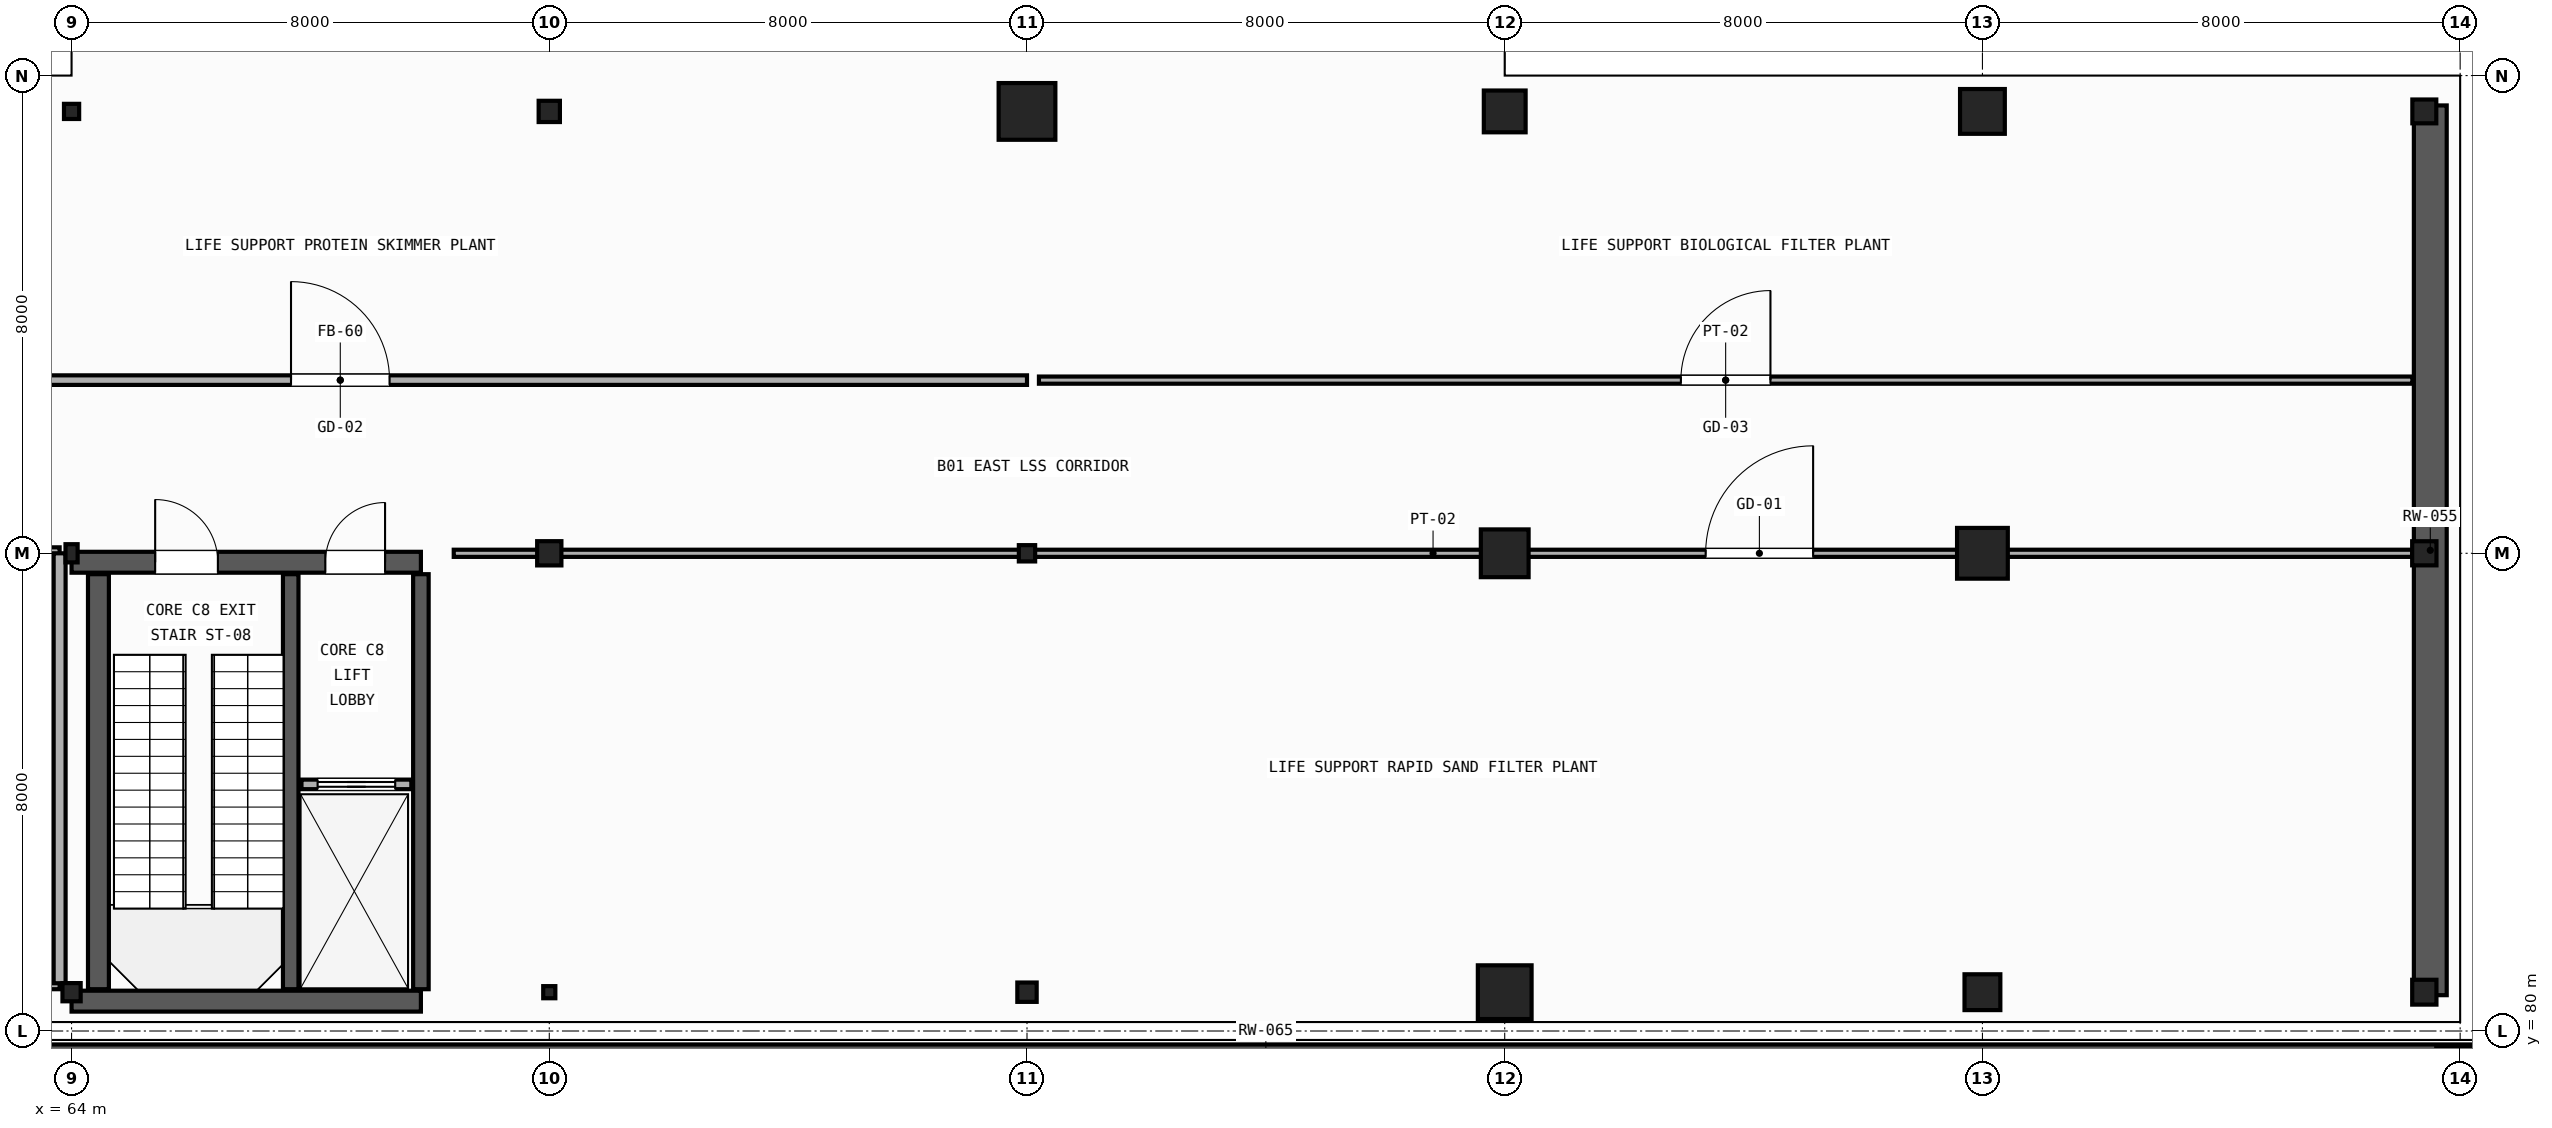
"""IFC4 building model, lengths in metres.
Left out: names, types, materials, properties, quantities, classifications, styles, units other than length and angle.
Written with IfcOpenShell. Run it as: python <this file> out.ifc"""

import sys

from ifc_helpers import new_model, si_unit, direction, frame, frame_2d, origin, origin_2d, place, context, subcontext, project, spatial, rectangle, hollow_rectangle, circle, hollow_circle, i_section, extrude, element, fill, save


model = new_model("IFC4")
c1 = context("Model", 3, precision=1e-05, world=origin(), true_north=direction((0.0, 1.0)))
c2 = subcontext(c1, "Body", "Model", "MODEL_VIEW")
j1 = project(units=[si_unit("LENGTHUNIT", "METRE"), si_unit("PLANEANGLEUNIT", "RADIAN")], contexts=[c1])
p1 = place(None, origin())
s1 = spatial("IfcSite", under=j1, at=p1, CompositionType="ELEMENT")
p2 = place(p1, origin())
s2 = spatial("IfcBuilding", under=s1, at=p2, CompositionType="ELEMENT")
p3 = place(p2, frame((0.0, 0.0, -5.4)))
s3 = spatial("IfcBuildingStorey", under=s2, at=p3, CompositionType="ELEMENT", Elevation=-5.4)
p4 = place(p3, frame((104.0, 79.35, 0.0), z_axis=(0.0, 0.0, 1.0), x_axis=(1.0, 0.0, 0.0)))
e1 = element("IfcColumn", 1, at=p4, inside=s3, PredefinedType="COLUMN", context=c2, shape_type="SweptSolid", body=[
    extrude(rectangle(XDim=0.8, YDim=0.8, at=origin_2d()), origin(), (0.0, 0.0, 1.0), 5.04),
])
p5 = place(p3, frame((64.0, 80.65, 0.0), z_axis=(0.0, 0.0, 1.0), x_axis=(0.0, 1.0, 0.0)))
e2 = element("IfcColumn", 2, at=p5, inside=s3, PredefinedType="COLUMN", context=c2, shape_type="SweptSolid", body=[
    extrude(hollow_rectangle(XDim=0.305, YDim=0.305, WallThickness=0.012, InnerFilletRadius=0.012, OuterFilletRadius=0.024, at=origin_2d()), origin(), (0.0, 0.0, 1.0), 5.04),
])
p6 = place(p3, frame((64.0, 88.0, 0.0), z_axis=(0.0, 0.0, 1.0), x_axis=(1.0, 0.0, 0.0)))
e3 = element("IfcColumn", 3, at=p6, inside=s3, PredefinedType="COLUMN", context=c2, shape_type="SweptSolid", body=[
    extrude(hollow_rectangle(XDim=0.203, YDim=0.305, WallThickness=0.009, InnerFilletRadius=0.009, OuterFilletRadius=0.018, at=origin_2d()), origin(), (0.0, 0.0, 1.0), 5.04),
])
p7 = place(p3, frame((64.0, 95.4, 0.0), z_axis=(0.0, 0.0, 1.0), x_axis=(0.0, 1.0, 0.0)))
e4 = element("IfcColumn", 4, at=p7, inside=s3, PredefinedType="COLUMN", context=c2, shape_type="SweptSolid", body=[
    extrude(hollow_rectangle(XDim=0.254, YDim=0.254, WallThickness=0.012, InnerFilletRadius=0.012, OuterFilletRadius=0.024, at=origin_2d()), origin(), (0.0, 0.0, 1.0), 5.04),
])
p8 = place(p3, frame((72.0, 80.65, 0.0), z_axis=(0.0, 0.0, 1.0), x_axis=(1.0, 0.0, 0.0)))
e5 = element("IfcColumn", 5, at=p8, inside=s3, PredefinedType="COLUMN", context=c2, shape_type="SweptSolid", body=[
    extrude(hollow_rectangle(XDim=0.203, YDim=0.203, WallThickness=0.009, InnerFilletRadius=0.009, OuterFilletRadius=0.018, at=origin_2d()), origin(), (0.0, 0.0, 1.0), 5.04),
])
p9 = place(p3, frame((72.0, 88.0, 0.0), z_axis=(0.0, 0.0, 1.0), x_axis=(0.0, 1.0, 0.0)))
e6 = element("IfcColumn", 6, at=p9, inside=s3, PredefinedType="COLUMN", context=c2, shape_type="SweptSolid", body=[
    extrude(hollow_circle(Radius=0.203, WallThickness=0.012, at=origin_2d()), origin(), (0.0, 0.0, 1.0), 5.04),
])
p10 = place(p3, frame((72.0, 95.4, 0.0), z_axis=(0.0, 0.0, 1.0), x_axis=(1.0, 0.0, 0.0)))
e7 = element("IfcColumn", 7, at=p10, inside=s3, PredefinedType="COLUMN", context=c2, shape_type="SweptSolid", body=[
    extrude(hollow_circle(Radius=0.178, WallThickness=0.012, at=origin_2d()), origin(), (0.0, 0.0, 1.0), 5.04),
])
p11 = place(p3, frame((80.0, 80.65, 0.0), z_axis=(0.0, 0.0, 1.0), x_axis=(0.0, 1.0, 0.0)))
e8 = element("IfcColumn", 8, at=p11, inside=s3, PredefinedType="COLUMN", context=c2, shape_type="SweptSolid", body=[
    extrude(hollow_circle(Radius=0.162, WallThickness=0.012, at=origin_2d()), origin(), (0.0, 0.0, 1.0), 5.04),
])
p12 = place(p3, frame((80.0, 88.0, 0.0), z_axis=(0.0, 0.0, 1.0), x_axis=(1.0, 0.0, 0.0)))
e9 = element("IfcColumn", 9, at=p12, inside=s3, PredefinedType="COLUMN", context=c2, shape_type="SweptSolid", body=[
    extrude(hollow_circle(Radius=0.136, WallThickness=0.012, at=origin_2d()), origin(), (0.0, 0.0, 1.0), 5.04),
])
p13 = place(p3, frame((80.0, 95.4, 0.0), z_axis=(0.0, 0.0, 1.0), x_axis=(0.0, 1.0, 0.0)))
e10 = element("IfcColumn", 10, at=p13, inside=s3, PredefinedType="COLUMN", context=c2, shape_type="SweptSolid", body=[
    extrude(rectangle(XDim=0.95, YDim=0.95, at=origin_2d()), origin(), (0.0, 0.0, 1.0), 5.04),
])
p14 = place(p3, frame((88.0, 80.65, 0.0), z_axis=(0.0, 0.0, 1.0), x_axis=(1.0, 0.0, 0.0)))
e11 = element("IfcColumn", 11, at=p14, inside=s3, PredefinedType="COLUMN", context=c2, shape_type="SweptSolid", body=[
    extrude(rectangle(XDim=0.9, YDim=0.9, at=origin_2d()), origin(), (0.0, 0.0, 1.0), 5.04),
])
p15 = place(p3, frame((88.0, 88.0, 0.0), z_axis=(0.0, 0.0, 1.0), x_axis=(0.0, 1.0, 0.0)))
e12 = element("IfcColumn", 12, at=p15, inside=s3, PredefinedType="COLUMN", context=c2, shape_type="SweptSolid", body=[
    extrude(rectangle(XDim=0.8, YDim=0.8, at=origin_2d()), origin(), (0.0, 0.0, 1.0), 5.04),
])
p16 = place(p3, frame((88.0, 95.4, 0.0), z_axis=(0.0, 0.0, 1.0), x_axis=(1.0, 0.0, 0.0)))
e13 = element("IfcColumn", 13, at=p16, inside=s3, PredefinedType="COLUMN", context=c2, shape_type="SweptSolid", body=[
    extrude(rectangle(XDim=0.7, YDim=0.7, at=origin_2d()), origin(), (0.0, 0.0, 1.0), 5.04),
])
p17 = place(p3, frame((96.0, 80.65, 0.0), z_axis=(0.0, 0.0, 1.0), x_axis=(0.0, 1.0, 0.0)))
e14 = element("IfcColumn", 14, at=p17, inside=s3, PredefinedType="COLUMN", context=c2, shape_type="SweptSolid", body=[
    extrude(rectangle(XDim=0.6, YDim=0.6, at=origin_2d()), origin(), (0.0, 0.0, 1.0), 5.04),
])
p18 = place(p3, frame((96.0, 88.0, 0.0), z_axis=(0.0, 0.0, 1.0), x_axis=(1.0, 0.0, 0.0)))
e15 = element("IfcColumn", 15, at=p18, inside=s3, PredefinedType="COLUMN", context=c2, shape_type="SweptSolid", body=[
    extrude(circle(Radius=0.425, at=origin_2d()), origin(), (0.0, 0.0, 1.0), 5.04),
])
p19 = place(p3, frame((96.0, 95.4, 0.0), z_axis=(0.0, 0.0, 1.0), x_axis=(0.0, 1.0, 0.0)))
e16 = element("IfcColumn", 16, at=p19, inside=s3, PredefinedType="COLUMN", context=c2, shape_type="SweptSolid", body=[
    extrude(circle(Radius=0.375, at=origin_2d()), origin(), (0.0, 0.0, 1.0), 5.04),
])
p20 = place(p3, frame((103.4, 80.65, 0.0), z_axis=(0.0, 0.0, 1.0), x_axis=(1.0, 0.0, 0.0)))
e17 = element("IfcColumn", 17, at=p20, inside=s3, PredefinedType="COLUMN", context=c2, shape_type="SweptSolid", body=[
    extrude(i_section(OverallWidth=0.406, OverallDepth=0.416, WebThickness=0.03, FlangeThickness=0.048, FilletRadius=0.015, at=origin_2d()), origin(), (0.0, 0.0, 1.0), 5.04),
])
p21 = place(p3, frame((103.4, 88.0, 0.0), z_axis=(0.0, 0.0, 1.0), x_axis=(0.0, 1.0, 0.0)))
e18 = element("IfcColumn", 18, at=p21, inside=s3, PredefinedType="COLUMN", context=c2, shape_type="SweptSolid", body=[
    extrude(i_section(OverallWidth=0.404, OverallDepth=0.407, WebThickness=0.027, FlangeThickness=0.044, FilletRadius=0.015, at=origin_2d()), origin(), (0.0, 0.0, 1.0), 5.04),
])
p22 = place(p3, frame((103.4, 95.4, 0.0), z_axis=(0.0, 0.0, 1.0), x_axis=(1.0, 0.0, 0.0)))
e19 = element("IfcColumn", 19, at=p22, inside=s3, PredefinedType="COLUMN", context=c2, shape_type="SweptSolid", body=[
    extrude(i_section(OverallWidth=0.401, OverallDepth=0.399, WebThickness=0.025, FlangeThickness=0.04, FilletRadius=0.015, at=origin_2d()), origin(), (0.0, 0.0, 1.0), 5.04),
])
p23 = place(p3, frame((60.0, 79.45, 0.0), z_axis=(0.0, 0.0, 1.0), x_axis=(1.0, 0.0, 0.0)))
e20 = element("IfcWall", 20, at=p23, inside=s3, PredefinedType="USERDEFINED", context=c2, shape_type="SweptSolid", body=[
    extrude(rectangle(XDim=48.0, YDim=0.65, at=frame_2d((24.0, 0.0))), origin(), (0.0, 0.0, 1.0), 5.02),
])
p24 = place(p3, frame((103.5, 80.6, 0.0), z_axis=(0.0, 0.0, 1.0), x_axis=(0.0, 1.0, 0.0)))
e21 = element("IfcWall", 21, at=p24, inside=s3, PredefinedType="USERDEFINED", context=c2, shape_type="SweptSolid", body=[
    extrude(rectangle(XDim=14.9, YDim=0.55, at=frame_2d((7.45, 0.0))), origin(), (0.0, 0.0, 1.0), 5.02),
])
p25 = place(p3, frame((64.0, 87.85, 0.0), z_axis=(0.0, 0.0, 1.0), x_axis=(1.0, 0.0, 0.0)))
e22 = element("IfcWall", 22, at=p25, inside=s3, PredefinedType="SHEAR", context=c2, shape_type="SweptSolid", body=[
    extrude(rectangle(XDim=5.85, YDim=0.35, at=frame_2d((2.925, 0.0))), origin(), (0.0, 0.0, 1.0), 5.03),
])
p26 = place(p25, frame((1.4, 0.0, 0.0)))
e23 = element("IfcOpeningElement", 23, at=p26, cuts=e22, PredefinedType="OPENING", context=c2, shape_type="SweptSolid", body=[
    extrude(rectangle(XDim=1.05, YDim=2.1, at=frame_2d((0.525, 1.05))), frame((0.0, 0.185, 0.0), z_axis=(0.0, -1.0, 0.0), x_axis=(1.0, 0.0, 0.0)), (0.0, 0.0, 1.0), 0.37),
])
p27 = place(p25, frame((4.25, 0.0, 0.0)))
e24 = element("IfcOpeningElement", 24, at=p27, cuts=e22, PredefinedType="OPENING", context=c2, shape_type="SweptSolid", body=[
    extrude(rectangle(XDim=1.0, YDim=2.15, at=frame_2d((0.5, 1.075))), frame((0.0, 0.185, 0.0), z_axis=(0.0, -1.0, 0.0), x_axis=(1.0, 0.0, 0.0)), (0.0, 0.0, 1.0), 0.37),
])
p28 = place(p3, frame((64.0, 80.5, 0.0), z_axis=(0.0, 0.0, 1.0), x_axis=(1.0, 0.0, 0.0)))
e25 = element("IfcWall", 25, at=p28, inside=s3, PredefinedType="SHEAR", context=c2, shape_type="SweptSolid", body=[
    extrude(rectangle(XDim=5.85, YDim=0.35, at=frame_2d((2.925, 0.0))), origin(), (0.0, 0.0, 1.0), 5.03),
])
p29 = place(p3, frame((64.45, 80.7, 0.0), z_axis=(0.0, 0.0, 1.0), x_axis=(0.0, 1.0, 0.0)))
e26 = element("IfcWall", 26, at=p29, inside=s3, PredefinedType="SHEAR", context=c2, shape_type="SweptSolid", body=[
    extrude(rectangle(XDim=6.95, YDim=0.35, at=frame_2d((3.475, 0.0))), origin(), (0.0, 0.0, 1.0), 5.03),
])
for number, where, z_axis, x_axis in (
    (27, (69.85, 80.7, 0.0), (0.0, 0.0, 1.0), (0.0, 1.0, 0.0)),
    (28, (67.67, 80.7, 0.0), (0.0, 0.0, 1.0), (0.0, 1.0, 0.0)),
):
    element("IfcWall", number, at=place(p3, frame(where, z_axis=z_axis, x_axis=x_axis)), inside=s3, PredefinedType="SHEAR", context=c2, shape_type="SweptSolid", body=[
        extrude(rectangle(XDim=6.95, YDim=0.26, at=frame_2d((3.475, 0.0))), origin(), (0.0, 0.0, 1.0), 5.03),
    ])
p30 = place(p3, frame((67.85, 84.13, 0.0), z_axis=(0.0, 0.0, 1.0), x_axis=(1.0, 0.0, 0.0)))
e29 = element("IfcWall", 29, at=p30, inside=s3, PredefinedType="PARTITIONING", context=c2, shape_type="SweptSolid", body=[
    extrude(rectangle(XDim=1.84, YDim=0.16, at=frame_2d((0.92, 0.0))), origin(), (0.0, 0.0, 1.0), 3.6),
])
p31 = place(p30, frame((0.27, 0.0, 0.0)))
e30 = element("IfcOpeningElement", 30, at=p31, cuts=e29, PredefinedType="OPENING", context=c2, shape_type="SweptSolid", body=[
    extrude(rectangle(XDim=1.3, YDim=2.2, at=frame_2d((0.65, 1.1))), frame((0.0, 0.09, 0.0), z_axis=(0.0, -1.0, 0.0), x_axis=(1.0, 0.0, 0.0)), (0.0, 0.0, 1.0), 0.18),
])
p32 = place(p3, frame((57.0, 88.0, 0.0), z_axis=(0.0, 0.0, 1.0), x_axis=(1.0, 0.0, 0.0)))
e31 = element("IfcWall", 31, at=p32, inside=s3, PredefinedType="PLUMBINGWALL", context=c2, shape_type="SweptSolid", body=[
    extrude(rectangle(XDim=6.8, YDim=0.2, at=frame_2d((3.4, 0.0))), origin(), (0.0, 0.0, 1.0), 4.29),
])
p33 = place(p32, frame((2.945, 0.0, 0.0)))
e32 = element("IfcOpeningElement", 32, at=p33, cuts=e31, PredefinedType="OPENING", context=c2, shape_type="SweptSolid", body=[
    extrude(rectangle(XDim=0.91, YDim=2.1, at=frame_2d((0.455, 1.05))), frame((0.0, 0.11, 0.0), z_axis=(0.0, -1.0, 0.0), x_axis=(1.0, 0.0, 0.0)), (0.0, 0.0, 1.0), 0.22),
])
p34 = place(p3, frame((57.0, 80.8, 0.0), z_axis=(0.0, 0.0, 1.0), x_axis=(1.0, 0.0, 0.0)))
e33 = element("IfcWall", 33, at=p34, inside=s3, PredefinedType="PLUMBINGWALL", context=c2, shape_type="SweptSolid", body=[
    extrude(rectangle(XDim=6.8, YDim=0.2, at=frame_2d((3.4, 0.0))), origin(), (0.0, 0.0, 1.0), 4.29),
])
p35 = place(p3, frame((63.8, 80.8, 0.0), z_axis=(0.0, 0.0, 1.0), x_axis=(0.0, 1.0, 0.0)))
e34 = element("IfcWall", 34, at=p35, inside=s3, PredefinedType="PLUMBINGWALL", context=c2, shape_type="SweptSolid", body=[
    extrude(rectangle(XDim=7.2, YDim=0.2, at=frame_2d((3.6, 0.0))), origin(), (0.0, 0.0, 1.0), 4.29),
])
p36 = place(p3, frame((70.4, 88.0, 0.0), z_axis=(0.0, 0.0, 1.0), x_axis=(1.0, 0.0, 0.0)))
e35 = element("IfcWall", 35, at=p36, inside=s3, PredefinedType="PARTITIONING", context=c2, shape_type="SweptSolid", body=[
    extrude(rectangle(XDim=32.8, YDim=0.12, at=frame_2d((16.4, 0.0))), origin(), (0.0, 0.0, 1.0), 4.238),
])
p37 = place(p36, frame((20.965, 0.0, 0.0)))
e36 = element("IfcOpeningElement", 36, at=p37, cuts=e35, PredefinedType="OPENING", context=c2, shape_type="SweptSolid", body=[
    extrude(rectangle(XDim=1.8, YDim=2.4, at=frame_2d((0.9, 1.2))), frame((0.0, 0.07, 0.0), z_axis=(0.0, -1.0, 0.0), x_axis=(1.0, 0.0, 0.0)), (0.0, 0.0, 1.0), 0.14),
])
p38 = place(p3, frame((57.0, 90.9, 0.0), z_axis=(0.0, 0.0, 1.0), x_axis=(1.0, 0.0, 0.0)))
e37 = element("IfcWall", 37, at=p38, inside=s3, PredefinedType="PARTITIONING", context=c2, shape_type="SweptSolid", body=[
    extrude(rectangle(XDim=23.0, YDim=0.16, at=frame_2d((11.5, 0.0))), origin(), (0.0, 0.0, 1.0), 4.29),
])
p39 = place(p38, frame((10.675, 0.0, 0.0)))
e38 = element("IfcOpeningElement", 38, at=p39, cuts=e37, PredefinedType="OPENING", context=c2, shape_type="SweptSolid", body=[
    extrude(rectangle(XDim=1.65, YDim=2.35, at=frame_2d((0.825, 1.175))), frame((0.0, 0.09, 0.0), z_axis=(0.0, -1.0, 0.0), x_axis=(1.0, 0.0, 0.0)), (0.0, 0.0, 1.0), 0.18),
])
p40 = place(p3, frame((80.2, 90.9, 0.0), z_axis=(0.0, 0.0, 1.0), x_axis=(1.0, 0.0, 0.0)))
e39 = element("IfcWall", 39, at=p40, inside=s3, PredefinedType="PARTITIONING", context=c2, shape_type="SweptSolid", body=[
    extrude(rectangle(XDim=23.0, YDim=0.12, at=frame_2d((11.5, 0.0))), origin(), (0.0, 0.0, 1.0), 4.238),
])
p41 = place(p40, frame((10.75, 0.0, 0.0)))
e40 = element("IfcOpeningElement", 40, at=p41, cuts=e39, PredefinedType="OPENING", context=c2, shape_type="SweptSolid", body=[
    extrude(rectangle(XDim=1.5, YDim=2.3, at=frame_2d((0.75, 1.15))), frame((0.0, 0.07, 0.0), z_axis=(0.0, -1.0, 0.0), x_axis=(1.0, 0.0, 0.0)), (0.0, 0.0, 1.0), 0.14),
])
p42 = place(p31, origin())
e41 = element("IfcDoor", 41, at=p42, inside=s3, OperationType="SLIDING_TO_LEFT", PredefinedType="DOOR", context=c2, shape_type="SweptSolid", body=[
    extrude(rectangle(XDim=1.3, YDim=2.2, at=frame_2d((0.65, 1.1))), frame((0.0, 0.025, 0.0), z_axis=(0.0, -1.0, 0.0), x_axis=(1.0, 0.0, 0.0)), (0.0, 0.0, 1.0), 0.05),
])
fill(e30, e41)
p43 = place(p26, origin())
e42 = element("IfcDoor", 42, at=p43, inside=s3, OperationType="SINGLE_SWING_LEFT", PredefinedType="DOOR", context=c2, shape_type="SweptSolid", body=[
    extrude(rectangle(XDim=1.05, YDim=2.1, at=frame_2d((0.525, 1.05))), frame((0.0, 0.025, 0.0), z_axis=(0.0, -1.0, 0.0), x_axis=(1.0, 0.0, 0.0)), (0.0, 0.0, 1.0), 0.05),
])
fill(e23, e42)
p44 = place(p27, origin())
e43 = element("IfcDoor", 43, at=p44, inside=s3, OperationType="SINGLE_SWING_RIGHT", PredefinedType="DOOR", context=c2, shape_type="SweptSolid", body=[
    extrude(rectangle(XDim=1.0, YDim=2.15, at=frame_2d((0.5, 1.075))), frame((0.0, 0.025, 0.0), z_axis=(0.0, -1.0, 0.0), x_axis=(1.0, 0.0, 0.0)), (0.0, 0.0, 1.0), 0.05),
])
fill(e24, e43)
p45 = place(p37, origin())
e44 = element("IfcDoor", 44, at=p45, inside=s3, OperationType="SINGLE_SWING_RIGHT", PredefinedType="DOOR", context=c2, shape_type="SweptSolid", body=[
    extrude(rectangle(XDim=1.8, YDim=2.4, at=frame_2d((0.9, 1.2))), frame((0.0, 0.025, 0.0), z_axis=(0.0, -1.0, 0.0), x_axis=(1.0, 0.0, 0.0)), (0.0, 0.0, 1.0), 0.05),
])
fill(e36, e44)
p46 = place(p39, origin())
e45 = element("IfcDoor", 45, at=p46, inside=s3, OperationType="SINGLE_SWING_LEFT", PredefinedType="DOOR", context=c2, shape_type="SweptSolid", body=[
    extrude(rectangle(XDim=1.65, YDim=2.35, at=frame_2d((0.825, 1.175))), frame((0.0, 0.025, 0.0), z_axis=(0.0, -1.0, 0.0), x_axis=(1.0, 0.0, 0.0)), (0.0, 0.0, 1.0), 0.05),
])
fill(e38, e45)
p47 = place(p41, origin())
e46 = element("IfcDoor", 46, at=p47, inside=s3, OperationType="SINGLE_SWING_RIGHT", PredefinedType="DOOR", context=c2, shape_type="SweptSolid", body=[
    extrude(rectangle(XDim=1.5, YDim=2.3, at=frame_2d((0.75, 1.15))), frame((0.0, 0.025, 0.0), z_axis=(0.0, -1.0, 0.0), x_axis=(1.0, 0.0, 0.0)), (0.0, 0.0, 1.0), 0.05),
])
fill(e40, e46)
save(model, sys.argv[1])
